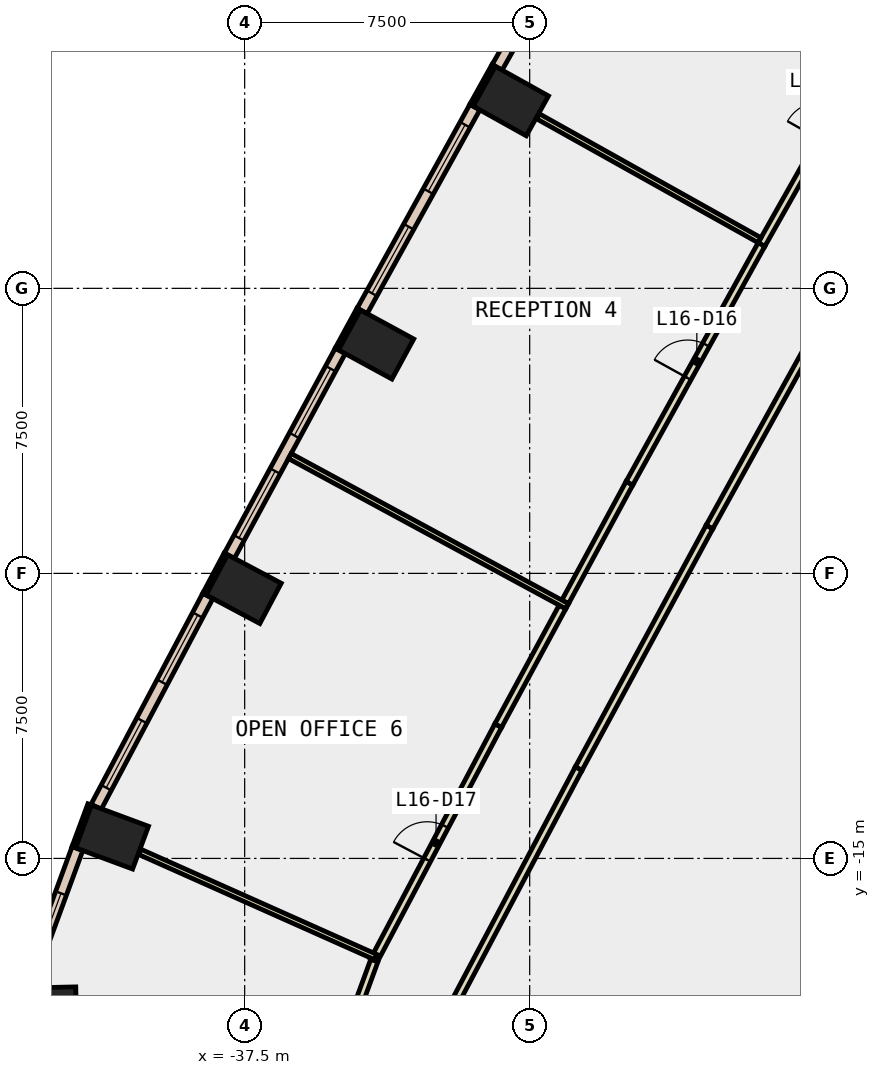
"""IFC4 building model, lengths in metres.
Left out: names, types, materials, properties, quantities, classifications, styles, units other than length and angle.
Written with IfcOpenShell. Run it as: python <this file> out.ifc"""

import sys

from ifc_helpers import new_model, si_unit, direction, frame, frame_2d, origin, origin_2d, place, context, subcontext, project, spatial, rectangle, extrude, element, fill, save


model = new_model("IFC4")
c1 = context("Model", 3, precision=1e-05, world=origin(), true_north=direction((0.0, 1.0)))
c2 = subcontext(c1, "Body", "Model", "MODEL_VIEW")
j1 = project(units=[si_unit("LENGTHUNIT", "METRE"), si_unit("PLANEANGLEUNIT", "RADIAN")], contexts=[c1])
p1 = place(None, origin())
s1 = spatial("IfcSite", under=j1, at=p1, CompositionType="ELEMENT")
p2 = place(p1, origin())
s2 = spatial("IfcBuilding", under=s1, at=p2, CompositionType="ELEMENT")
p3 = place(p2, frame((0.0, 0.0, 77.0)))
s3 = spatial("IfcBuildingStorey", under=s2, at=p3, CompositionType="ELEMENT", Elevation=77.0)
for number, where, z_axis, x_axis in (
    (1, (-30.497, 4.928, -0.4), (0.0, 0.0, 1.0), (0.487, 0.873, 0.0)),
    (2, (-34.041, -1.477, -0.4), (0.0, 0.0, 1.0), (0.478, 0.878, 0.0)),
    (3, (-37.526, -7.914, -0.4), (0.0, 0.0, 1.0), (0.469, 0.883, 0.0)),
    (4, (-40.99, -14.438, -0.4), (0.0, 0.0, 1.0), (0.348, 0.937, 0.0)),
    (5, (-42.731, -18.998, -0.4), (0.0, 0.0, 1.0), (-0.023, 1.0, 0.0)),
):
    element("IfcColumn", number, at=place(p3, frame(where, z_axis=z_axis, x_axis=x_axis)), inside=s3, PredefinedType="COLUMN", context=c2, shape_type="SweptSolid", body=[
        extrude(rectangle(XDim=1.2, YDim=1.6, at=origin_2d()), origin(), (0.0, 0.0, 1.0), 4.0),
    ])
p4 = place(p3, frame((-30.947, 5.866, 0.0), z_axis=(0.0, 0.0, 1.0), x_axis=(-0.486817526853, -0.873503689488, 0.0)))
e6 = element("IfcWall", 6, at=p4, inside=s3, PredefinedType="STANDARD", context=c2, shape_type="SweptSolid", body=[
    extrude(rectangle(XDim=1.2, YDim=0.1, at=frame_2d((0.6, 0.0))), origin(), (0.0, 0.0, 1.0), 3.6),
])
p5 = place(p3, frame((-34.5, -0.544, 0.0), z_axis=(0.0, 0.0, 1.0), x_axis=(-0.478267644701, -0.878214131082, 0.0)))
e7 = element("IfcWall", 7, at=p5, inside=s3, PredefinedType="STANDARD", context=c2, shape_type="SweptSolid", body=[
    extrude(rectangle(XDim=1.2, YDim=0.1, at=frame_2d((0.6, 0.0))), origin(), (0.0, 0.0, 1.0), 3.6),
])
p6 = place(p3, frame((-37.995, -6.986, 0.0), z_axis=(0.0, 0.0, 1.0), x_axis=(-0.469467784567, -0.882949601763, 0.0)))
e8 = element("IfcWall", 8, at=p6, inside=s3, PredefinedType="STANDARD", context=c2, shape_type="SweptSolid", body=[
    extrude(rectangle(XDim=1.199, YDim=0.1, at=frame_2d((0.6, 0.0))), origin(), (0.0, 0.0, 1.0), 3.6),
])
p7 = place(p3, frame((-41.578, -13.58, 0.0), z_axis=(0.0, 0.0, 1.0), x_axis=(-0.348446984414, -0.937328490473, 0.0)))
e9 = element("IfcWall", 9, at=p7, inside=s3, PredefinedType="STANDARD", context=c2, shape_type="SweptSolid", body=[
    extrude(rectangle(XDim=1.2, YDim=0.1, at=frame_2d((0.6, 0.0))), origin(), (0.0, 0.0, 1.0), 3.6),
])
p8 = place(p3, frame((-27.84, 11.151, 0.0), z_axis=(0.0, 0.0, 1.0), x_axis=(-0.492097935349, -0.870539845168, 0.0)))
e10 = element("IfcWall", 10, at=p8, inside=s3, PredefinedType="STANDARD", context=c2, shape_type="SweptSolid", body=[
    extrude(rectangle(XDim=6.131, YDim=0.3, at=frame_2d((3.065, 0.0))), origin(), (0.0, 0.0, 1.0), 3.6),
])
p9 = place(p8, frame((0.533, 0.0, 0.9)))
e11 = element("IfcOpeningElement", 11, at=p9, cuts=e10, PredefinedType="OPENING", context=c2, shape_type="SweptSolid", body=[
    extrude(rectangle(XDim=2.0, YDim=2.6, at=frame_2d((1.0, 1.3))), frame((0.0, 0.16, 0.0), z_axis=(0.0, -1.0, 0.0), x_axis=(1.0, 0.0, 0.0)), (0.0, 0.0, 1.0), 0.32),
])
p10 = place(p8, frame((3.598, 0.0, 0.9)))
e12 = element("IfcOpeningElement", 12, at=p10, cuts=e10, PredefinedType="OPENING", context=c2, shape_type="SweptSolid", body=[
    extrude(rectangle(XDim=2.0, YDim=2.6, at=frame_2d((1.0, 1.3))), frame((0.0, 0.16, 0.0), z_axis=(0.0, -1.0, 0.0), x_axis=(1.0, 0.0, 0.0)), (0.0, 0.0, 1.0), 0.32),
])
p11 = place(p3, frame((-31.442, 4.769, 0.0), z_axis=(0.0, 0.0, 1.0), x_axis=(-0.484025698618, -0.875053782963, 0.0)))
e13 = element("IfcWall", 13, at=p11, inside=s3, PredefinedType="STANDARD", context=c2, shape_type="SweptSolid", body=[
    extrude(rectangle(XDim=6.13, YDim=0.3, at=frame_2d((3.065, 0.0))), origin(), (0.0, 0.0, 1.0), 3.6),
])
p12 = place(p11, frame((0.532, 0.0, 0.9)))
e14 = element("IfcOpeningElement", 14, at=p12, cuts=e13, PredefinedType="OPENING", context=c2, shape_type="SweptSolid", body=[
    extrude(rectangle(XDim=2.0, YDim=2.6, at=frame_2d((1.0, 1.3))), frame((0.0, 0.16, 0.0), z_axis=(0.0, -1.0, 0.0), x_axis=(1.0, 0.0, 0.0)), (0.0, 0.0, 1.0), 0.32),
])
p13 = place(p11, frame((3.597, 0.0, 0.9)))
e15 = element("IfcOpeningElement", 15, at=p13, cuts=e13, PredefinedType="OPENING", context=c2, shape_type="SweptSolid", body=[
    extrude(rectangle(XDim=2.0, YDim=2.6, at=frame_2d((1.0, 1.3))), frame((0.0, 0.16, 0.0), z_axis=(0.0, -1.0, 0.0), x_axis=(1.0, 0.0, 0.0)), (0.0, 0.0, 1.0), 0.32),
])
p14 = place(p3, frame((-34.984, -1.645, 0.0), z_axis=(0.0, 0.0, 1.0), x_axis=(-0.476174096946, -0.879351027404, 0.0)))
e16 = element("IfcWall", 16, at=p14, inside=s3, PredefinedType="STANDARD", context=c2, shape_type="SweptSolid", body=[
    extrude(rectangle(XDim=6.131, YDim=0.3, at=frame_2d((3.065, 0.0))), origin(), (0.0, 0.0, 1.0), 3.6),
])
p15 = place(p14, frame((0.533, 0.0, 0.9)))
e17 = element("IfcOpeningElement", 17, at=p15, cuts=e16, PredefinedType="OPENING", context=c2, shape_type="SweptSolid", body=[
    extrude(rectangle(XDim=2.0, YDim=2.6, at=frame_2d((1.0, 1.3))), frame((0.0, 0.16, 0.0), z_axis=(0.0, -1.0, 0.0), x_axis=(1.0, 0.0, 0.0)), (0.0, 0.0, 1.0), 0.32),
])
p16 = place(p14, frame((3.598, 0.0, 0.9)))
e18 = element("IfcOpeningElement", 18, at=p16, cuts=e16, PredefinedType="OPENING", context=c2, shape_type="SweptSolid", body=[
    extrude(rectangle(XDim=2.0, YDim=2.6, at=frame_2d((1.0, 1.3))), frame((0.0, 0.16, 0.0), z_axis=(0.0, -1.0, 0.0), x_axis=(1.0, 0.0, 0.0)), (0.0, 0.0, 1.0), 0.32),
])
p17 = place(p3, frame((-38.469, -8.092, 0.0), z_axis=(0.0, 0.0, 1.0), x_axis=(-0.467968066899, -0.883745375299, 0.0)))
e19 = element("IfcWall", 19, at=p17, inside=s3, PredefinedType="STANDARD", context=c2, shape_type="SweptSolid", body=[
    extrude(rectangle(XDim=6.282, YDim=0.3, at=frame_2d((3.141, 0.0))), origin(), (0.0, 0.0, 1.0), 3.6),
])
p18 = place(p17, frame((0.571, 0.0, 0.9)))
e20 = element("IfcOpeningElement", 20, at=p18, cuts=e19, PredefinedType="OPENING", context=c2, shape_type="SweptSolid", body=[
    extrude(rectangle(XDim=2.0, YDim=2.6, at=frame_2d((1.0, 1.3))), frame((0.0, 0.16, 0.0), z_axis=(0.0, -1.0, 0.0), x_axis=(1.0, 0.0, 0.0)), (0.0, 0.0, 1.0), 0.32),
])
p19 = place(p17, frame((3.712, 0.0, 0.9)))
e21 = element("IfcOpeningElement", 21, at=p19, cuts=e19, PredefinedType="OPENING", context=c2, shape_type="SweptSolid", body=[
    extrude(rectangle(XDim=2.0, YDim=2.6, at=frame_2d((1.0, 1.3))), frame((0.0, 0.16, 0.0), z_axis=(0.0, -1.0, 0.0), x_axis=(1.0, 0.0, 0.0)), (0.0, 0.0, 1.0), 0.32),
])
p20 = place(p3, frame((-41.9, -14.74, 0.0), z_axis=(0.0, 0.0, 1.0), x_axis=(-0.344819708397, -0.938668934556, 0.0)))
e22 = element("IfcWall", 22, at=p20, inside=s3, PredefinedType="STANDARD", context=c2, shape_type="SweptSolid", body=[
    extrude(rectangle(XDim=3.91, YDim=0.3, at=frame_2d((1.955, 0.0))), origin(), (0.0, 0.0, 1.0), 3.6),
])
p21 = place(p20, frame((1.255, 0.0, 0.9)))
e23 = element("IfcOpeningElement", 23, at=p21, cuts=e22, PredefinedType="OPENING", context=c2, shape_type="SweptSolid", body=[
    extrude(rectangle(XDim=1.4, YDim=2.6, at=frame_2d((0.7, 1.3))), frame((0.0, 0.16, 0.0), z_axis=(0.0, -1.0, 0.0), x_axis=(1.0, 0.0, 0.0)), (0.0, 0.0, 1.0), 0.32),
])
p22 = place(p3, frame((-21.77, 0.046, 0.0), z_axis=(0.0, 0.0, 1.0), x_axis=(-0.484062485326, -0.875033433818, 0.0)))
e24 = element("IfcWall", 24, at=p22, inside=s3, PredefinedType="PARTITIONING", context=c2, shape_type="SweptSolid", body=[
    extrude(rectangle(XDim=7.23, YDim=0.2, at=frame_2d((3.615, 0.0))), origin(), (0.0, 0.0, 1.0), 3.6),
])
p23 = place(p3, frame((-25.27, -6.281, 0.0), z_axis=(0.0, 0.0, 1.0), x_axis=(-0.476128647722, -0.879375636926, 0.0)))
e25 = element("IfcWall", 25, at=p23, inside=s3, PredefinedType="PARTITIONING", context=c2, shape_type="SweptSolid", body=[
    extrude(rectangle(XDim=7.229, YDim=0.2, at=frame_2d((3.615, 0.0))), origin(), (0.0, 0.0, 1.0), 3.6),
])
p24 = place(p3, frame((-28.712, -12.638, 0.0), z_axis=(0.0, 0.0, 1.0), x_axis=(-0.46804565502, -0.883704285843, 0.0)))
e26 = element("IfcWall", 26, at=p24, inside=s3, PredefinedType="PARTITIONING", context=c2, shape_type="SweptSolid", body=[
    extrude(rectangle(XDim=6.818, YDim=0.2, at=frame_2d((3.409, 0.0))), origin(), (0.0, 0.0, 1.0), 3.6),
])
p25 = place(p3, frame((-23.901, 1.152, 0.0), z_axis=(0.0, 0.0, 1.0), x_axis=(0.492063845089, 0.870559114797, 0.0)))
e27 = element("IfcWall", 27, at=p25, inside=s3, PredefinedType="PARTITIONING", context=c2, shape_type="SweptSolid", body=[
    extrude(rectangle(XDim=7.326, YDim=0.2, at=frame_2d((3.663, 0.0))), origin(), (0.0, 0.0, 1.0), 3.6),
])
p26 = place(p25, frame((3.163, 0.0, 0.0)))
e28 = element("IfcOpeningElement", 28, at=p26, cuts=e27, PredefinedType="OPENING", context=c2, shape_type="SweptSolid", body=[
    extrude(rectangle(XDim=1.0, YDim=2.1, at=frame_2d((0.5, 1.05))), frame((0.0, 0.11, 0.0), z_axis=(0.0, -1.0, 0.0), x_axis=(1.0, 0.0, 0.0)), (0.0, 0.0, 1.0), 0.22),
])
p27 = place(p3, frame((-29.066, -8.251, 0.0), z_axis=(0.0, 0.0, 1.0), x_axis=(0.476123690619, 0.879378320878, 0.0)))
e29 = element("IfcWall", 29, at=p27, inside=s3, PredefinedType="PARTITIONING", context=c2, shape_type="SweptSolid", body=[
    extrude(rectangle(XDim=3.552, YDim=0.2, at=frame_2d((1.776, 0.0))), origin(), (0.0, 0.0, 1.0), 3.6),
])
p28 = place(p3, frame((-27.375, -5.128, 0.0), z_axis=(0.0, 0.0, 1.0), x_axis=(0.484068035355, 0.875030363558, 0.0)))
e30 = element("IfcWall", 30, at=p28, inside=s3, PredefinedType="PARTITIONING", context=c2, shape_type="SweptSolid", body=[
    extrude(rectangle(XDim=7.177, YDim=0.2, at=frame_2d((3.588, 0.0))), origin(), (0.0, 0.0, 1.0), 3.6),
])
p29 = place(p28, frame((3.163, 0.0, 0.0)))
e31 = element("IfcOpeningElement", 31, at=p29, cuts=e30, PredefinedType="OPENING", context=c2, shape_type="SweptSolid", body=[
    extrude(rectangle(XDim=1.0, YDim=2.1, at=frame_2d((0.5, 1.05))), frame((0.0, 0.11, 0.0), z_axis=(0.0, -1.0, 0.0), x_axis=(1.0, 0.0, 0.0)), (0.0, 0.0, 1.0), 0.22),
])
p30 = place(p3, frame((-34.1, -17.683, 0.0), z_axis=(0.0, 0.0, 1.0), x_axis=(0.468043346631, 0.883705508456, 0.0)))
e32 = element("IfcWall", 32, at=p30, inside=s3, PredefinedType="PARTITIONING", context=c2, shape_type="SweptSolid", body=[
    extrude(rectangle(XDim=6.991, YDim=0.2, at=frame_2d((3.496, 0.0))), origin(), (0.0, 0.0, 1.0), 3.6),
])
p31 = place(p30, frame((2.996, 0.0, 0.0)))
e33 = element("IfcOpeningElement", 33, at=p31, cuts=e32, PredefinedType="OPENING", context=c2, shape_type="SweptSolid", body=[
    extrude(rectangle(XDim=1.0, YDim=2.1, at=frame_2d((0.5, 1.05))), frame((0.0, 0.11, 0.0), z_axis=(0.0, -1.0, 0.0), x_axis=(1.0, 0.0, 0.0)), (0.0, 0.0, 1.0), 0.22),
])
p32 = place(p3, frame((-30.828, -11.505, 0.0), z_axis=(0.0, 0.0, 1.0), x_axis=(0.476267641688, 0.879300365905, 0.0)))
e34 = element("IfcWall", 34, at=p32, inside=s3, PredefinedType="PARTITIONING", context=c2, shape_type="SweptSolid", body=[
    extrude(rectangle(XDim=3.55, YDim=0.2, at=frame_2d((1.775, 0.0))), origin(), (0.0, 0.0, 1.0), 3.6),
])
p33 = place(p3, frame((-34.835, -19.724, 0.0), z_axis=(0.0, 0.0, 1.0), x_axis=(0.34459875492, 0.938750072228, 0.0)))
e35 = element("IfcWall", 35, at=p33, inside=s3, PredefinedType="PARTITIONING", context=c2, shape_type="SweptSolid", body=[
    extrude(rectangle(XDim=2.168, YDim=0.2, at=frame_2d((1.084, 0.0))), origin(), (0.0, 0.0, 1.0), 3.6),
])
p34 = place(p3, frame((-23.951, 1.266, 0.0), z_axis=(0.0, 0.0, 1.0), x_axis=(-0.872786908026, 0.488101437385, 0.0)))
e36 = element("IfcWall", 36, at=p34, inside=s3, PredefinedType="PARTITIONING", context=c2, shape_type="SweptSolid", body=[
    extrude(rectangle(XDim=6.681, YDim=0.15, at=frame_2d((3.34, 0.0))), origin(), (0.0, 0.0, 1.0), 3.6),
])
p35 = place(p3, frame((-29.014, -8.365, 0.0), z_axis=(0.0, 0.0, 1.0), x_axis=(-0.879354069803, 0.476168478504, 0.0)))
e37 = element("IfcWall", 37, at=p35, inside=s3, PredefinedType="PARTITIONING", context=c2, shape_type="SweptSolid", body=[
    extrude(rectangle(XDim=8.299, YDim=0.15, at=frame_2d((4.15, 0.0))), origin(), (0.0, 0.0, 1.0), 3.6),
])
p36 = place(p3, frame((-34.053, -17.595, 0.0), z_axis=(0.0, 0.0, 1.0), x_axis=(-0.913298274621, 0.40729137184, 0.0)))
e38 = element("IfcWall", 38, at=p36, inside=s3, PredefinedType="PARTITIONING", context=c2, shape_type="SweptSolid", body=[
    extrude(rectangle(XDim=6.796, YDim=0.15, at=frame_2d((3.398, 0.0))), origin(), (0.0, 0.0, 1.0), 3.6),
])
p37 = place(p12, origin())
e39 = element("IfcWindow", 39, at=p37, inside=s3, PartitioningType="SINGLE_PANEL", PredefinedType="WINDOW", context=c2, shape_type="SweptSolid", body=[
    extrude(rectangle(XDim=2.0, YDim=2.6, at=frame_2d((1.0, 1.3))), frame((0.0, 0.03, 0.0), z_axis=(0.0, -1.0, 0.0), x_axis=(1.0, 0.0, 0.0)), (0.0, 0.0, 1.0), 0.06),
])
fill(e14, e39)
p38 = place(p13, origin())
e40 = element("IfcWindow", 40, at=p38, inside=s3, PartitioningType="SINGLE_PANEL", PredefinedType="WINDOW", context=c2, shape_type="SweptSolid", body=[
    extrude(rectangle(XDim=2.0, YDim=2.6, at=frame_2d((1.0, 1.3))), frame((0.0, 0.03, 0.0), z_axis=(0.0, -1.0, 0.0), x_axis=(1.0, 0.0, 0.0)), (0.0, 0.0, 1.0), 0.06),
])
fill(e15, e40)
p39 = place(p15, origin())
e41 = element("IfcWindow", 41, at=p39, inside=s3, PartitioningType="SINGLE_PANEL", PredefinedType="WINDOW", context=c2, shape_type="SweptSolid", body=[
    extrude(rectangle(XDim=2.0, YDim=2.6, at=frame_2d((1.0, 1.3))), frame((0.0, 0.03, 0.0), z_axis=(0.0, -1.0, 0.0), x_axis=(1.0, 0.0, 0.0)), (0.0, 0.0, 1.0), 0.06),
])
fill(e17, e41)
p40 = place(p16, origin())
e42 = element("IfcWindow", 42, at=p40, inside=s3, PartitioningType="SINGLE_PANEL", PredefinedType="WINDOW", context=c2, shape_type="SweptSolid", body=[
    extrude(rectangle(XDim=2.0, YDim=2.6, at=frame_2d((1.0, 1.3))), frame((0.0, 0.03, 0.0), z_axis=(0.0, -1.0, 0.0), x_axis=(1.0, 0.0, 0.0)), (0.0, 0.0, 1.0), 0.06),
])
fill(e18, e42)
p41 = place(p18, origin())
e43 = element("IfcWindow", 43, at=p41, inside=s3, PartitioningType="SINGLE_PANEL", PredefinedType="WINDOW", context=c2, shape_type="SweptSolid", body=[
    extrude(rectangle(XDim=2.0, YDim=2.6, at=frame_2d((1.0, 1.3))), frame((0.0, 0.03, 0.0), z_axis=(0.0, -1.0, 0.0), x_axis=(1.0, 0.0, 0.0)), (0.0, 0.0, 1.0), 0.06),
])
fill(e20, e43)
p42 = place(p19, origin())
e44 = element("IfcWindow", 44, at=p42, inside=s3, PartitioningType="SINGLE_PANEL", PredefinedType="WINDOW", context=c2, shape_type="SweptSolid", body=[
    extrude(rectangle(XDim=2.0, YDim=2.6, at=frame_2d((1.0, 1.3))), frame((0.0, 0.03, 0.0), z_axis=(0.0, -1.0, 0.0), x_axis=(1.0, 0.0, 0.0)), (0.0, 0.0, 1.0), 0.06),
])
fill(e21, e44)
p43 = place(p21, origin())
e45 = element("IfcWindow", 45, at=p43, inside=s3, PartitioningType="SINGLE_PANEL", PredefinedType="WINDOW", context=c2, shape_type="SweptSolid", body=[
    extrude(rectangle(XDim=1.4, YDim=2.6, at=frame_2d((0.7, 1.3))), frame((0.0, 0.03, 0.0), z_axis=(0.0, -1.0, 0.0), x_axis=(1.0, 0.0, 0.0)), (0.0, 0.0, 1.0), 0.06),
])
fill(e23, e45)
p44 = place(p29, origin())
e46 = element("IfcDoor", 46, at=p44, inside=s3, OperationType="SINGLE_SWING_LEFT", PredefinedType="DOOR", context=c2, shape_type="SweptSolid", body=[
    extrude(rectangle(XDim=1.0, YDim=2.1, at=frame_2d((0.5, 1.05))), frame((0.0, 0.025, 0.0), z_axis=(0.0, -1.0, 0.0), x_axis=(1.0, 0.0, 0.0)), (0.0, 0.0, 1.0), 0.05),
])
fill(e31, e46)
p45 = place(p31, origin())
e47 = element("IfcDoor", 47, at=p45, inside=s3, OperationType="SINGLE_SWING_LEFT", PredefinedType="DOOR", context=c2, shape_type="SweptSolid", body=[
    extrude(rectangle(XDim=1.0, YDim=2.1, at=frame_2d((0.5, 1.05))), frame((0.0, 0.025, 0.0), z_axis=(0.0, -1.0, 0.0), x_axis=(1.0, 0.0, 0.0)), (0.0, 0.0, 1.0), 0.05),
])
fill(e33, e47)
save(model, sys.argv[1])
